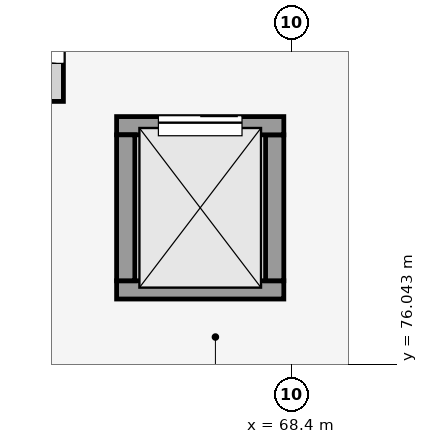
"""IFC4 building model, lengths in metres.
Left out: names, types, materials, properties, quantities, classifications, styles, units other than length and angle.
Written with IfcOpenShell. Run it as: python <this file> out.ifc"""

import sys

from ifc_helpers import new_model, si_unit, direction, frame, frame_2d, origin, place, context, subcontext, project, spatial, rectangle, extrude, element, fill, save


model = new_model("IFC4")
c1 = context("Model", 3, precision=1e-05, world=origin(), true_north=direction((0.0, 1.0)))
c2 = subcontext(c1, "Body", "Model", "MODEL_VIEW")
j1 = project(units=[si_unit("LENGTHUNIT", "METRE"), si_unit("PLANEANGLEUNIT", "RADIAN")], contexts=[c1])
p1 = place(None, origin())
s1 = spatial("IfcSite", under=j1, at=p1, CompositionType="ELEMENT")
p2 = place(p1, origin())
s2 = spatial("IfcBuilding", under=s1, at=p2, CompositionType="ELEMENT")
p3 = place(p2, frame((0.0, 0.0, -4.2)))
s3 = spatial("IfcBuildingStorey", under=s2, at=p3, CompositionType="ELEMENT", Elevation=-4.2)
p4 = place(p3, frame((68.3, 77.02, 0.0), z_axis=(0.0, 0.0, 1.0), x_axis=(-1.0, 0.0, 0.0)))
e1 = element("IfcWall", 1, at=p4, inside=s3, PredefinedType="SHEAR", context=c2, shape_type="SweptSolid", body=[
    extrude(rectangle(XDim=2.2, YDim=0.24, at=frame_2d((1.1, 0.0))), origin(), (0.0, 0.0, 1.0), 4.2),
])
p5 = place(p3, frame((68.18, 79.06, 0.0), z_axis=(0.0, 0.0, 1.0), x_axis=(0.0, -1.0, 0.0)))
e2 = element("IfcWall", 2, at=p5, inside=s3, PredefinedType="SHEAR", context=c2, shape_type="SweptSolid", body=[
    extrude(rectangle(XDim=1.92, YDim=0.24, at=frame_2d((0.96, 0.0))), origin(), (0.0, 0.0, 1.0), 4.2),
])
p6 = place(p3, frame((66.1, 79.18, 0.0), z_axis=(0.0, 0.0, 1.0), x_axis=(1.0, 0.0, 0.0)))
e3 = element("IfcWall", 3, at=p6, inside=s3, PredefinedType="SHEAR", context=c2, shape_type="SweptSolid", body=[
    extrude(rectangle(XDim=2.2, YDim=0.24, at=frame_2d((1.1, 0.0))), origin(), (0.0, 0.0, 1.0), 4.2),
])
p7 = place(p6, frame((0.55, 0.0, 0.0)))
e4 = element("IfcOpeningElement", 4, at=p7, cuts=e3, PredefinedType="OPENING", context=c2, shape_type="SweptSolid", body=[
    extrude(rectangle(XDim=1.1, YDim=2.15, at=frame_2d((0.55, 1.075))), frame((0.0, 0.13, 0.0), z_axis=(0.0, -1.0, 0.0), x_axis=(1.0, 0.0, 0.0)), (0.0, 0.0, 1.0), 0.26),
])
p8 = place(p3, frame((66.22, 77.14, 0.0), z_axis=(0.0, 0.0, 1.0), x_axis=(0.0, 1.0, 0.0)))
e5 = element("IfcWall", 5, at=p8, inside=s3, PredefinedType="SHEAR", context=c2, shape_type="SweptSolid", body=[
    extrude(rectangle(XDim=1.92, YDim=0.24, at=frame_2d((0.96, 0.0))), origin(), (0.0, 0.0, 1.0), 4.2),
])
p9 = place(p3, frame((65.3, 79.5, 0.0), z_axis=(0.0, 0.0, 1.0), x_axis=(0.0, 1.0, 0.0)))
e6 = element("IfcWall", 6, at=p9, inside=s3, PredefinedType="PARTITIONING", context=c2, shape_type="SweptSolid", body=[
    extrude(rectangle(XDim=2.3, YDim=0.2, at=frame_2d((1.15, 0.0))), origin(), (0.0, 0.0, 1.0), 2.9),
])
p10 = place(p9, frame((0.5, 0.0, 0.0)))
e7 = element("IfcOpeningElement", 7, at=p10, cuts=e6, PredefinedType="OPENING", context=c2, shape_type="SweptSolid", body=[
    extrude(rectangle(XDim=1.3, YDim=2.2, at=frame_2d((0.65, 1.1))), frame((0.0, 0.11, 0.0), z_axis=(0.0, -1.0, 0.0), x_axis=(1.0, 0.0, 0.0)), (0.0, 0.0, 1.0), 0.22),
])
p11 = place(p7, origin())
e8 = element("IfcDoor", 8, at=p11, inside=s3, OperationType="SLIDING_TO_RIGHT", PredefinedType="DOOR", context=c2, shape_type="SweptSolid", body=[
    extrude(rectangle(XDim=1.1, YDim=2.15, at=frame_2d((0.55, 1.075))), frame((0.0, 0.025, 0.0), z_axis=(0.0, -1.0, 0.0), x_axis=(1.0, 0.0, 0.0)), (0.0, 0.0, 1.0), 0.05),
])
fill(e4, e8)
p12 = place(p10, origin())
e9 = element("IfcDoor", 9, at=p12, inside=s3, OperationType="SINGLE_SWING_RIGHT", PredefinedType="DOOR", context=c2, shape_type="SweptSolid", body=[
    extrude(rectangle(XDim=1.3, YDim=2.2, at=frame_2d((0.65, 1.1))), frame((0.0, 0.025, 0.0), z_axis=(0.0, -1.0, 0.0), x_axis=(1.0, 0.0, 0.0)), (0.0, 0.0, 1.0), 0.05),
])
fill(e7, e9)
save(model, sys.argv[1])
